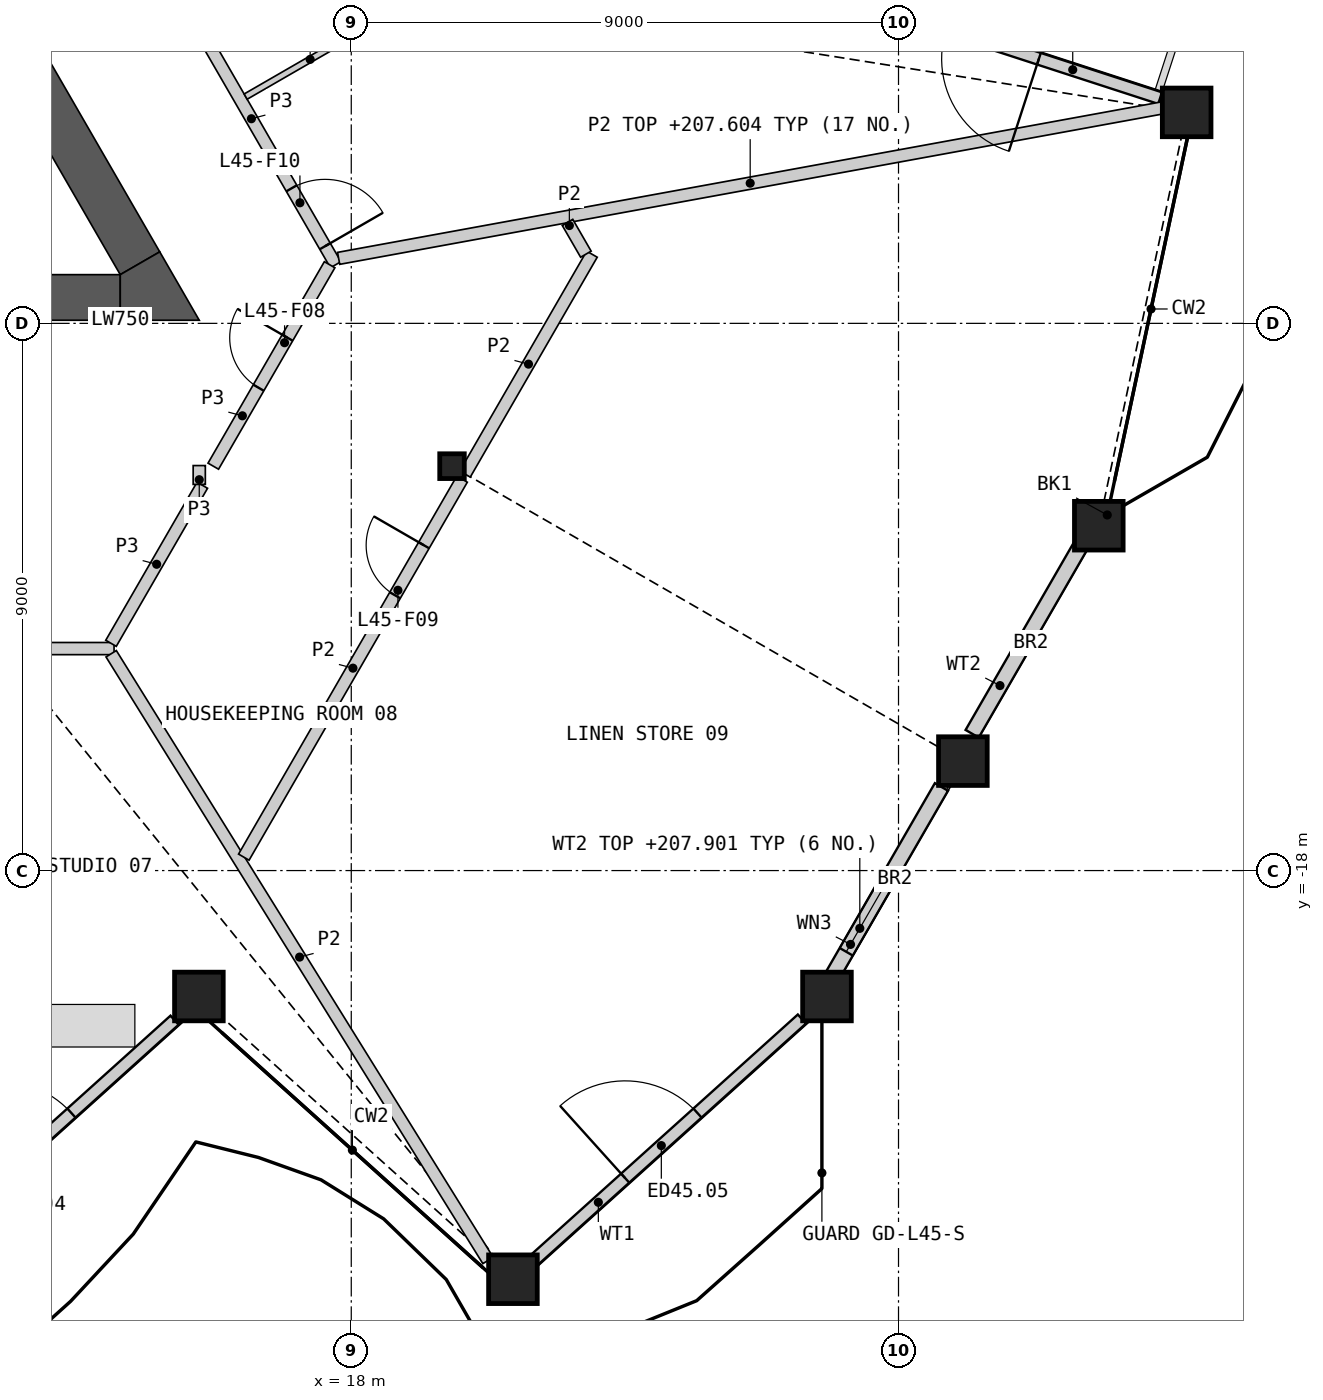
"""IFC4 building model, lengths in metres.
Left out: names, types, materials, properties, quantities, classifications, styles, units other than length and angle.
Written with IfcOpenShell. Run it as: python <this file> out.ifc"""

import sys

from ifc_helpers import new_model, si_unit, direction, frame, frame_2d, origin, origin_2d, place, context, subcontext, project, spatial, polyline, rectangle, hollow_rectangle, i_section, outline, extrude, element, fill, save


model = new_model("IFC4")
c1 = context("Model", 3, precision=1e-05, world=origin(), true_north=direction((0.0, 1.0)))
c2 = subcontext(c1, "Body", "Model", "MODEL_VIEW")
j1 = project(units=[si_unit("LENGTHUNIT", "METRE"), si_unit("PLANEANGLEUNIT", "RADIAN")], contexts=[c1])
p1 = place(None, origin())
s1 = spatial("IfcSite", under=j1, at=p1, CompositionType="ELEMENT")
p2 = place(p1, origin())
s2 = spatial("IfcBuilding", under=s1, at=p2, CompositionType="ELEMENT")
p3 = place(p2, frame((0.0, 0.0, 205.2)))
s3 = spatial("IfcBuildingStorey", under=s2, at=p3, CompositionType="ELEMENT", Elevation=205.2)
for number, where, z_axis, x_axis in (
    (1, (15.494, -20.071, 0.0), (0.0, 0.0, 1.0), (1.0, 0.0, 0.0)),
    (2, (20.659, -24.722, 0.0), (0.0, 0.0, 1.0), (1.0, 0.0, 0.0)),
    (3, (25.823, -20.071, 0.0), (0.0, 0.0, 1.0), (1.0, 0.0, 0.0)),
    (4, (28.059, -16.2, 0.0), (0.0, 0.0, 1.0), (1.0, 0.0, 0.0)),
    (5, (30.294, -12.328, 0.0), (0.0, 0.0, 1.0), (1.0, 0.0, 0.0)),
    (6, (31.739, -5.53, 0.0), (0.0, 0.0, 1.0), (1.0, 0.0, 0.0)),
):
    element("IfcColumn", number, at=place(p3, frame(where, z_axis=z_axis, x_axis=x_axis)), inside=s3, PredefinedType="COLUMN", context=c2, shape_type="SweptSolid", body=[
        extrude(hollow_rectangle(XDim=0.8, YDim=0.8, WallThickness=0.05, at=origin_2d()), origin(), (0.0, 0.0, 1.0), 3.6),
    ])
p4 = place(p3, frame((19.657, -11.349, 0.0), z_axis=(0.0, 0.0, 1.0), x_axis=(1.0, 0.0, 0.0)))
e7 = element("IfcColumn", 7, at=p4, inside=s3, PredefinedType="COLUMN", context=c2, shape_type="SweptSolid", body=[
    extrude(i_section(OverallWidth=0.404, OverallDepth=0.407, WebThickness=0.027, FlangeThickness=0.044, at=origin_2d()), origin(), (0.0, 0.0, 1.0), 3.6),
])
p5 = place(p3, frame((10.651, -24.461, 0.0), z_axis=(0.0, 0.0, 1.0), x_axis=(0.743135744435, 0.669140691741, 0.0)))
e8 = element("IfcWall", 8, at=p5, inside=s3, PredefinedType="SOLIDWALL", context=c2, shape_type="SweptSolid", body=[
    extrude(rectangle(XDim=5.979, YDim=0.2, at=frame_2d((2.989, 0.0))), origin(), (0.0, 0.0, 1.0), 2.701),
])
p6 = place(p5, frame((2.096, 0.0, 0.0)))
e9 = element("IfcOpeningElement", 9, at=p6, cuts=e8, PredefinedType="OPENING", context=c2, shape_type="SweptSolid", body=[
    extrude(rectangle(XDim=1.6, YDim=2.4, at=frame_2d((0.8, 1.2))), frame((0.0, 0.11, 0.0), z_axis=(0.0, -1.0, 0.0), x_axis=(1.0, 0.0, 0.0)), (0.0, 0.0, 1.0), 0.22),
])
p7 = place(p3, frame((20.947, -24.461, 0.0), z_axis=(0.0, 0.0, 1.0), x_axis=(0.743162770969, 0.669110675333, 0.0)))
e10 = element("IfcWall", 10, at=p7, inside=s3, PredefinedType="SOLIDWALL", context=c2, shape_type="SweptSolid", body=[
    extrude(rectangle(XDim=6.007, YDim=0.2, at=frame_2d((3.003, 0.0))), origin(), (0.0, 0.0, 1.0), 2.701),
])
p8 = place(p7, frame((2.096, 0.0, 0.0)))
e11 = element("IfcOpeningElement", 11, at=p8, cuts=e10, PredefinedType="OPENING", context=c2, shape_type="SweptSolid", body=[
    extrude(rectangle(XDim=1.6, YDim=2.4, at=frame_2d((0.8, 1.2))), frame((0.0, 0.11, 0.0), z_axis=(0.0, -1.0, 0.0), x_axis=(1.0, 0.0, 0.0)), (0.0, 0.0, 1.0), 0.22),
])
p9 = place(p3, frame((25.916, -19.726, 0.0), z_axis=(0.0, 0.0, 1.0), x_axis=(0.500054932303, 0.865993686281, 0.0)))
e12 = element("IfcWall", 12, at=p9, inside=s3, PredefinedType="SOLIDWALL", context=c2, shape_type="SweptSolid", body=[
    extrude(rectangle(XDim=3.581, YDim=0.25, at=frame_2d((1.79, 0.0))), origin(), (0.0, 0.0, 1.0), 2.701),
])
p10 = place(p9, frame((0.45, 0.0, 1.7)))
e13 = element("IfcOpeningElement", 13, at=p10, cuts=e12, PredefinedType="OPENING", context=c2, shape_type="SweptSolid", body=[
    extrude(rectangle(XDim=1.4, YDim=0.8, at=frame_2d((0.7, 0.4))), frame((0.0, 0.135, 0.0), z_axis=(0.0, -1.0, 0.0), x_axis=(1.0, 0.0, 0.0)), (0.0, 0.0, 1.0), 0.27),
])
p11 = place(p3, frame((28.211, -15.75, 0.0), z_axis=(0.0, 0.0, 1.0), x_axis=(0.499978523533, 0.866037802874, 0.0)))
e14 = element("IfcWall", 14, at=p11, inside=s3, PredefinedType="SOLIDWALL", context=c2, shape_type="SweptSolid", body=[
    extrude(rectangle(XDim=3.659, YDim=0.25, at=frame_2d((1.83, 0.0))), origin(), (0.0, 0.0, 1.0), 2.701),
])
p12 = place(p3, frame((31.302, -5.295, 0.0), z_axis=(0.0, 0.0, 1.0), x_axis=(-0.951059297078, 0.309008435874, 0.0)))
e15 = element("IfcWall", 15, at=p12, inside=s3, PredefinedType="SOLIDWALL", context=c2, shape_type="SweptSolid", body=[
    extrude(rectangle(XDim=6.044, YDim=0.2, at=frame_2d((3.022, 0.0))), origin(), (0.0, 0.0, 1.0), 2.404),
])
p13 = place(p12, frame((2.096, 0.0, 0.0)))
e16 = element("IfcOpeningElement", 16, at=p13, cuts=e15, PredefinedType="OPENING", context=c2, shape_type="SweptSolid", body=[
    extrude(rectangle(XDim=1.6, YDim=2.4, at=frame_2d((0.8, 1.2))), frame((0.0, 0.11, 0.0), z_axis=(0.0, -1.0, 0.0), x_axis=(1.0, 0.0, 0.0)), (0.0, 0.0, 1.0), 0.22),
])
p14 = place(p3, frame((10.525, -8.574, 0.0), z_axis=(0.0, 0.0, 1.0), x_axis=(1.0, 0.0, 0.0)))
e17 = element("IfcWall", 17, at=p14, inside=s3, PredefinedType="SHEAR", context=c2, shape_type="SweptSolid", body=[
    extrude(rectangle(XDim=3.676, YDim=0.75, at=frame_2d((1.838, 0.0))), origin(), (0.0, 0.0, 1.0), 3.25),
])
p15 = place(p3, frame((14.526, -8.011, 0.0), z_axis=(0.0, 0.0, 1.0), x_axis=(-0.499996012963, 0.866027705689, 0.0)))
e18 = element("IfcWall", 18, at=p15, inside=s3, PredefinedType="SHEAR", context=c2, shape_type="SweptSolid", body=[
    extrude(rectangle(XDim=15.039, YDim=0.75, at=frame_2d((7.519, 0.0))), origin(), (0.0, 0.0, 1.0), 3.25),
])
p16 = place(p3, origin())
e19 = element("IfcWall", 19, at=p16, inside=s3, PredefinedType="SHEAR", context=c2, shape_type="SweptSolid", body=[
    extrude(outline(polyline([(14.201, -8.949), (14.201, -8.199), (14.851, -7.824), (15.5, -8.949), (14.201, -8.949)])), origin(), (0.0, 0.0, 1.0), 3.25),
])
p17 = place(p3, frame((-14.099, -14.349, 0.0), z_axis=(0.0, 0.0, 1.0), x_axis=(1.0, 0.0, 0.0)))
e20 = element("IfcWall", 20, at=p17, inside=s3, PredefinedType="PARTITIONING", context=c2, shape_type="SweptSolid", body=[
    extrude(rectangle(XDim=28.198, YDim=0.2, at=frame_2d((14.099, 0.0))), origin(), (0.0, 0.0, 1.0), 3.25),
])
p18 = place(p17, frame((1.053, 0.0, 0.0)))
e21 = element("IfcOpeningElement", 21, at=p18, cuts=e20, PredefinedType="OPENING", context=c2, shape_type="SweptSolid", body=[
    extrude(rectangle(XDim=1.8, YDim=2.1, at=frame_2d((0.9, 1.05))), frame((0.0, 0.11, 0.0), z_axis=(0.0, -1.0, 0.0), x_axis=(1.0, 0.0, 0.0)), (0.0, 0.0, 1.0), 0.22),
])
p19 = place(p17, frame((4.064, 0.0, 0.0)))
e22 = element("IfcOpeningElement", 22, at=p19, cuts=e20, PredefinedType="OPENING", context=c2, shape_type="SweptSolid", body=[
    extrude(rectangle(XDim=1.0, YDim=2.1, at=frame_2d((0.5, 1.05))), frame((0.0, 0.11, 0.0), z_axis=(0.0, -1.0, 0.0), x_axis=(1.0, 0.0, 0.0)), (0.0, 0.0, 1.0), 0.22),
])
p20 = place(p17, frame((12.796, 0.0, 0.0)))
e23 = element("IfcOpeningElement", 23, at=p20, cuts=e20, PredefinedType="OPENING", context=c2, shape_type="SweptSolid", body=[
    extrude(rectangle(XDim=1.0, YDim=2.1, at=frame_2d((0.5, 1.05))), frame((0.0, 0.11, 0.0), z_axis=(0.0, -1.0, 0.0), x_axis=(1.0, 0.0, 0.0)), (0.0, 0.0, 1.0), 0.22),
])
p21 = place(p17, frame((18.318, 0.0, 0.0)))
e24 = element("IfcOpeningElement", 24, at=p21, cuts=e20, PredefinedType="OPENING", context=c2, shape_type="SweptSolid", body=[
    extrude(rectangle(XDim=1.8, YDim=2.1, at=frame_2d((0.9, 1.05))), frame((0.0, 0.11, 0.0), z_axis=(0.0, -1.0, 0.0), x_axis=(1.0, 0.0, 0.0)), (0.0, 0.0, 1.0), 0.22),
])
p22 = place(p17, frame((25.345, 0.0, 0.0)))
e25 = element("IfcOpeningElement", 25, at=p22, cuts=e20, PredefinedType="OPENING", context=c2, shape_type="SweptSolid", body=[
    extrude(rectangle(XDim=1.8, YDim=2.1, at=frame_2d((0.9, 1.05))), frame((0.0, 0.11, 0.0), z_axis=(0.0, -1.0, 0.0), x_axis=(1.0, 0.0, 0.0)), (0.0, 0.0, 1.0), 0.22),
])
p23 = place(p3, frame((14.971, -3.233, 0.0), z_axis=(0.0, 0.0, 1.0), x_axis=(0.500003221507, -0.866023543838, 0.0)))
e26 = element("IfcWall", 26, at=p23, inside=s3, PredefinedType="PARTITIONING", context=c2, shape_type="SweptSolid", body=[
    extrude(rectangle(XDim=5.545, YDim=0.2, at=frame_2d((2.772, 0.0))), origin(), (0.0, 0.0, 1.0), 3.25),
])
p24 = place(p23, frame((4.094, 0.0, 0.0)))
e27 = element("IfcOpeningElement", 27, at=p24, cuts=e26, PredefinedType="OPENING", context=c2, shape_type="SweptSolid", body=[
    extrude(rectangle(XDim=1.1, YDim=2.1, at=frame_2d((0.55, 1.05))), frame((0.0, 0.11, 0.0), z_axis=(0.0, -1.0, 0.0), x_axis=(1.0, 0.0, 0.0)), (0.0, 0.0, 1.0), 0.22),
])
p25 = place(p3, frame((15.731, -11.349, 0.0), z_axis=(0.0, 0.0, 1.0), x_axis=(0.499961815444, 0.866047448526, 0.0)))
e28 = element("IfcWall", 28, at=p25, inside=s3, PredefinedType="PARTITIONING", context=c2, shape_type="SweptSolid", body=[
    extrude(rectangle(XDim=3.826, YDim=0.2, at=frame_2d((1.913, 0.0))), origin(), (0.0, 0.0, 1.0), 3.25),
])
p26 = place(p25, frame((1.49, 0.0, 0.0)))
e29 = element("IfcOpeningElement", 29, at=p26, cuts=e28, PredefinedType="OPENING", context=c2, shape_type="SweptSolid", body=[
    extrude(rectangle(XDim=0.95, YDim=2.1, at=frame_2d((0.475, 1.05))), frame((0.0, 0.11, 0.0), z_axis=(0.0, -1.0, 0.0), x_axis=(1.0, 0.0, 0.0)), (0.0, 0.0, 1.0), 0.22),
])
p27 = place(p3, frame((14.049, -14.262, 0.0), z_axis=(0.0, 0.0, 1.0), x_axis=(0.500048608389, 0.865997337899, 0.0)))
e30 = element("IfcWall", 30, at=p27, inside=s3, PredefinedType="PARTITIONING", context=c2, shape_type="SweptSolid", body=[
    extrude(rectangle(XDim=3.002, YDim=0.2, at=frame_2d((1.501, 0.0))), origin(), (0.0, 0.0, 1.0), 3.25),
])
p28 = place(p3, frame((15.5, -11.649, 0.0), z_axis=(0.0, 0.0, 1.0), x_axis=(0.0, 1.0, 0.0)))
e31 = element("IfcWall", 31, at=p28, inside=s3, PredefinedType="PARTITIONING", context=c2, shape_type="SweptSolid", body=[
    extrude(rectangle(XDim=0.31, YDim=0.2, at=frame_2d((0.155, 0.0))), origin(), (0.0, 0.0, 1.0), 3.25),
])
p29 = place(p3, frame((17.792, -7.931, 0.0), z_axis=(0.0, 0.0, 1.0), x_axis=(0.983720538919, 0.179705039744, 0.0)))
e32 = element("IfcWall", 32, at=p29, inside=s3, PredefinedType="PARTITIONING", context=c2, shape_type="SweptSolid", body=[
    extrude(rectangle(XDim=13.761, YDim=0.2, at=frame_2d((6.88, 0.0))), origin(), (0.0, 0.0, 1.0), 2.404),
])
p30 = place(p3, frame((14.052, -14.434, 0.0), z_axis=(0.0, 0.0, 1.0), x_axis=(0.527581174538, -0.849504622868, 0.0)))
e33 = element("IfcWall", 33, at=p30, inside=s3, PredefinedType="PARTITIONING", context=c2, shape_type="SweptSolid", body=[
    extrude(rectangle(XDim=11.747, YDim=0.2, at=frame_2d((5.873, 0.0))), origin(), (0.0, 0.0, 1.0), 2.404),
])
p31 = place(p3, frame((16.233, -17.779, 0.0), z_axis=(0.0, 0.0, 1.0), x_axis=(0.500008997517, 0.866020209003, 0.0)))
e34 = element("IfcWall", 34, at=p31, inside=s3, PredefinedType="PARTITIONING", context=c2, shape_type="SweptSolid", body=[
    extrude(rectangle(XDim=7.178, YDim=0.2, at=frame_2d((3.589, 0.0))), origin(), (0.0, 0.0, 1.0), 2.404),
])
p32 = place(p31, frame((4.973, 0.0, 0.0)))
e35 = element("IfcOpeningElement", 35, at=p32, cuts=e34, PredefinedType="OPENING", context=c2, shape_type="SweptSolid", body=[
    extrude(rectangle(XDim=0.95, YDim=2.1, at=frame_2d((0.475, 1.05))), frame((0.0, 0.11, 0.0), z_axis=(0.0, -1.0, 0.0), x_axis=(1.0, 0.0, 0.0)), (0.0, 0.0, 1.0), 0.22),
])
p33 = place(p3, frame((19.871, -11.479, 0.0), z_axis=(0.0, 0.0, 1.0), x_axis=(0.499987304225, 0.866032733569, 0.0)))
e36 = element("IfcWall", 36, at=p33, inside=s3, PredefinedType="PARTITIONING", context=c2, shape_type="SweptSolid", body=[
    extrude(rectangle(XDim=4.176, YDim=0.2, at=frame_2d((2.088, 0.0))), origin(), (0.0, 0.0, 1.0), 2.404),
])
p34 = place(p3, frame((21.556, -7.339, 0.0), z_axis=(0.0, 0.0, 1.0), x_axis=(0.50022374246, -0.865896187473, 0.0)))
e37 = element("IfcWall", 37, at=p34, inside=s3, PredefinedType="PARTITIONING", context=c2, shape_type="SweptSolid", body=[
    extrude(rectangle(XDim=0.604, YDim=0.2, at=frame_2d((0.302, 0.0))), origin(), (0.0, 0.0, 1.0), 2.404),
])
p35 = place(p3, frame((16.263, -5.271, 0.0), z_axis=(0.0, 0.0, 1.0), x_axis=(0.866057815567, 0.499943856944, 0.0)))
e38 = element("IfcWall", 38, at=p35, inside=s3, PredefinedType="PARTITIONING", context=c2, shape_type="SweptSolid", body=[
    extrude(rectangle(XDim=2.45, YDim=0.1, at=frame_2d((1.225, 0.0))), origin(), (0.0, 0.0, 1.0), 2.404),
])
p36 = place(p6, origin())
e39 = element("IfcDoor", 39, at=p36, inside=s3, OperationType="DOUBLE_DOOR_SINGLE_SWING", PredefinedType="DOOR", context=c2, shape_type="SweptSolid", body=[
    extrude(rectangle(XDim=1.6, YDim=2.4, at=frame_2d((0.8, 1.2))), frame((0.0, 0.025, 0.0), z_axis=(0.0, -1.0, 0.0), x_axis=(1.0, 0.0, 0.0)), (0.0, 0.0, 1.0), 0.05),
])
fill(e9, e39)
p37 = place(p8, origin())
e40 = element("IfcDoor", 40, at=p37, inside=s3, OperationType="DOUBLE_DOOR_SINGLE_SWING", PredefinedType="DOOR", context=c2, shape_type="SweptSolid", body=[
    extrude(rectangle(XDim=1.6, YDim=2.4, at=frame_2d((0.8, 1.2))), frame((0.0, 0.025, 0.0), z_axis=(0.0, -1.0, 0.0), x_axis=(1.0, 0.0, 0.0)), (0.0, 0.0, 1.0), 0.05),
])
fill(e11, e40)
p38 = place(p10, origin())
e41 = element("IfcWindow", 41, at=p38, inside=s3, PartitioningType="SINGLE_PANEL", PredefinedType="WINDOW", context=c2, shape_type="SweptSolid", body=[
    extrude(rectangle(XDim=1.4, YDim=0.8, at=frame_2d((0.7, 0.4))), frame((0.0, 0.03, 0.0), z_axis=(0.0, -1.0, 0.0), x_axis=(1.0, 0.0, 0.0)), (0.0, 0.0, 1.0), 0.06),
])
fill(e13, e41)
p39 = place(p13, origin())
e42 = element("IfcDoor", 42, at=p39, inside=s3, OperationType="DOUBLE_DOOR_SINGLE_SWING", PredefinedType="DOOR", context=c2, shape_type="SweptSolid", body=[
    extrude(rectangle(XDim=1.6, YDim=2.4, at=frame_2d((0.8, 1.2))), frame((0.0, 0.025, 0.0), z_axis=(0.0, -1.0, 0.0), x_axis=(1.0, 0.0, 0.0)), (0.0, 0.0, 1.0), 0.05),
])
fill(e16, e42)
p40 = place(p26, origin())
e43 = element("IfcDoor", 43, at=p40, inside=s3, OperationType="SINGLE_SWING_RIGHT", PredefinedType="DOOR", context=c2, shape_type="SweptSolid", body=[
    extrude(rectangle(XDim=0.95, YDim=2.1, at=frame_2d((0.475, 1.05))), frame((0.0, 0.025, 0.0), z_axis=(0.0, -1.0, 0.0), x_axis=(1.0, 0.0, 0.0)), (0.0, 0.0, 1.0), 0.05),
])
fill(e29, e43)
p41 = place(p32, origin())
e44 = element("IfcDoor", 44, at=p41, inside=s3, OperationType="SINGLE_SWING_RIGHT", PredefinedType="DOOR", context=c2, shape_type="SweptSolid", body=[
    extrude(rectangle(XDim=0.95, YDim=2.1, at=frame_2d((0.475, 1.05))), frame((0.0, 0.025, 0.0), z_axis=(0.0, -1.0, 0.0), x_axis=(1.0, 0.0, 0.0)), (0.0, 0.0, 1.0), 0.05),
])
fill(e35, e44)
p42 = place(p24, origin())
e45 = element("IfcDoor", 45, at=p42, inside=s3, OperationType="SINGLE_SWING_RIGHT", PredefinedType="DOOR", context=c2, shape_type="SweptSolid", body=[
    extrude(rectangle(XDim=1.1, YDim=2.1, at=frame_2d((0.55, 1.05))), frame((0.0, 0.025, 0.0), z_axis=(0.0, -1.0, 0.0), x_axis=(1.0, 0.0, 0.0)), (0.0, 0.0, 1.0), 0.05),
])
fill(e27, e45)
save(model, sys.argv[1])
